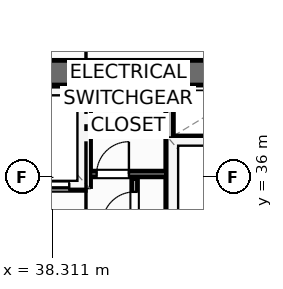
"""IFC4 building model, lengths in metres.
Left out: names, types, materials, properties, quantities, classifications, styles, units other than length and angle.
Written with IfcOpenShell. Run it as: python <this file> out.ifc"""

import sys

from ifc_helpers import new_model, si_unit, direction, frame, frame_2d, origin, place, context, subcontext, project, spatial, rectangle, extrude, element, fill, save


model = new_model("IFC4")
c1 = context("Model", 3, precision=1e-05, world=origin(), true_north=direction((0.0, 1.0)))
c2 = subcontext(c1, "Body", "Model", "MODEL_VIEW")
j1 = project(units=[si_unit("LENGTHUNIT", "METRE"), si_unit("PLANEANGLEUNIT", "RADIAN")], contexts=[c1])
p1 = place(None, origin())
s1 = spatial("IfcSite", under=j1, at=p1, CompositionType="ELEMENT")
p2 = place(p1, origin())
s2 = spatial("IfcBuilding", under=s1, at=p2, CompositionType="ELEMENT")
p3 = place(p2, frame((0.0, 0.0, 174.6)))
s3 = spatial("IfcBuildingStorey", under=s2, at=p3, CompositionType="ELEMENT", Elevation=174.6)
p4 = place(p3, frame((30.48, 38.745, 0.0), z_axis=(0.0, 0.0, 1.0), x_axis=(1.0, 0.0, 0.0)))
e1 = element("IfcWall", 1, at=p4, inside=s3, PredefinedType="SHEAR", context=c2, shape_type="SweptSolid", body=[
    extrude(rectangle(XDim=17.44, YDim=0.65, at=frame_2d((8.72, 0.0))), origin(), (0.0, 0.0, 1.0), 3.45),
])
p5 = place(p3, frame((41.42, 36.98, 0.0), z_axis=(0.0, 0.0, 1.0), x_axis=(1.0, 0.0, 0.0)))
e2 = element("IfcWall", 2, at=p5, inside=s3, PredefinedType="PARTITIONING", context=c2, shape_type="SweptSolid", body=[
    extrude(rectangle(XDim=2.18, YDim=0.2, at=frame_2d((1.09, 0.0))), origin(), (0.0, 0.0, 1.0), 3.45),
])
p6 = place(p3, frame((41.4, 34.44, 0.0), z_axis=(0.0, 0.0, 1.0), x_axis=(0.0, 1.0, 0.0)))
e3 = element("IfcWall", 3, at=p6, inside=s3, PredefinedType="PARTITIONING", context=c2, shape_type="SweptSolid", body=[
    extrude(rectangle(XDim=3.9, YDim=0.2, at=frame_2d((1.95, 0.0))), origin(), (0.0, 0.0, 1.0), 3.45),
])
p7 = place(p3, frame((37.06, 35.75, 0.0), z_axis=(0.0, 0.0, 1.0), x_axis=(1.0, 0.0, 0.0)))
e4 = element("IfcWall", 4, at=p7, inside=s3, PredefinedType="PARTITIONING", context=c2, shape_type="SweptSolid", body=[
    extrude(rectangle(XDim=2.12, YDim=0.2, at=frame_2d((1.06, 0.0))), origin(), (0.0, 0.0, 1.0), 3.45),
])
p8 = place(p7, frame((0.4, 0.0, 0.0)))
e5 = element("IfcOpeningElement", 5, at=p8, cuts=e4, PredefinedType="OPENING", context=c2, shape_type="SweptSolid", body=[
    extrude(rectangle(XDim=1.3, YDim=2.2, at=frame_2d((0.65, 1.1))), frame((0.0, 0.11, 0.0), z_axis=(0.0, -1.0, 0.0), x_axis=(1.0, 0.0, 0.0)), (0.0, 0.0, 1.0), 0.22),
])
p9 = place(p3, frame((39.22, 35.75, 0.0), z_axis=(0.0, 0.0, 1.0), x_axis=(0.0, 1.0, 0.0)))
e6 = element("IfcWall", 6, at=p9, inside=s3, PredefinedType="PARTITIONING", context=c2, shape_type="SweptSolid", body=[
    extrude(rectangle(XDim=2.59, YDim=0.2, at=frame_2d((1.295, 0.0))), origin(), (0.0, 0.0, 1.0), 3.45),
])
p10 = place(p3, frame((39.3, 36.08, 0.0), z_axis=(0.0, 0.0, 1.0), x_axis=(1.0, 0.0, 0.0)))
e7 = element("IfcWall", 7, at=p10, inside=s3, PredefinedType="PARTITIONING", context=c2, shape_type="SweptSolid", body=[
    extrude(rectangle(XDim=2.02, YDim=0.15, at=frame_2d((1.01, 0.0))), origin(), (0.0, 0.0, 1.0), 3.45),
])
p11 = place(p10, frame((0.18, 0.0, 0.0)))
e8 = element("IfcOpeningElement", 8, at=p11, cuts=e7, PredefinedType="OPENING", context=c2, shape_type="SweptSolid", body=[
    extrude(rectangle(XDim=0.85, YDim=2.05, at=frame_2d((0.425, 1.025))), frame((0.0, 0.085, 0.0), z_axis=(0.0, -1.0, 0.0), x_axis=(1.0, 0.0, 0.0)), (0.0, 0.0, 1.0), 0.17),
])
p12 = place(p3, frame((40.48, 34.44, 0.0), z_axis=(0.0, 0.0, 1.0), x_axis=(0.0, 1.0, 0.0)))
e9 = element("IfcWall", 9, at=p12, inside=s3, PredefinedType="PARTITIONING", context=c2, shape_type="SweptSolid", body=[
    extrude(rectangle(XDim=1.52, YDim=0.15, at=frame_2d((0.76, 0.0))), origin(), (0.0, 0.0, 1.0), 3.45),
])
p13 = place(p12, frame((0.32, 0.0, 0.0)))
e10 = element("IfcOpeningElement", 10, at=p13, cuts=e9, PredefinedType="OPENING", context=c2, shape_type="SweptSolid", body=[
    extrude(rectangle(XDim=0.85, YDim=2.05, at=frame_2d((0.425, 1.025))), frame((0.0, 0.085, 0.0), z_axis=(0.0, -1.0, 0.0), x_axis=(1.0, 0.0, 0.0)), (0.0, 0.0, 1.0), 0.17),
])
p14 = place(p8, origin())
e11 = element("IfcDoor", 11, at=p14, inside=s3, OperationType="SLIDING_TO_LEFT", PredefinedType="DOOR", context=c2, shape_type="SweptSolid", body=[
    extrude(rectangle(XDim=1.3, YDim=2.2, at=frame_2d((0.65, 1.1))), frame((0.0, 0.025, 0.0), z_axis=(0.0, -1.0, 0.0), x_axis=(1.0, 0.0, 0.0)), (0.0, 0.0, 1.0), 0.05),
])
fill(e5, e11)
p15 = place(p11, origin())
e12 = element("IfcDoor", 12, at=p15, inside=s3, OperationType="SINGLE_SWING_RIGHT", PredefinedType="DOOR", context=c2, shape_type="SweptSolid", body=[
    extrude(rectangle(XDim=0.85, YDim=2.05, at=frame_2d((0.425, 1.025))), frame((0.0, 0.025, 0.0), z_axis=(0.0, -1.0, 0.0), x_axis=(1.0, 0.0, 0.0)), (0.0, 0.0, 1.0), 0.05),
])
fill(e8, e12)
p16 = place(p13, origin())
e13 = element("IfcDoor", 13, at=p16, inside=s3, OperationType="SINGLE_SWING_LEFT", PredefinedType="DOOR", context=c2, shape_type="SweptSolid", body=[
    extrude(rectangle(XDim=0.85, YDim=2.05, at=frame_2d((0.425, 1.025))), frame((0.0, 0.025, 0.0), z_axis=(0.0, -1.0, 0.0), x_axis=(1.0, 0.0, 0.0)), (0.0, 0.0, 1.0), 0.05),
])
fill(e10, e13)
save(model, sys.argv[1])
